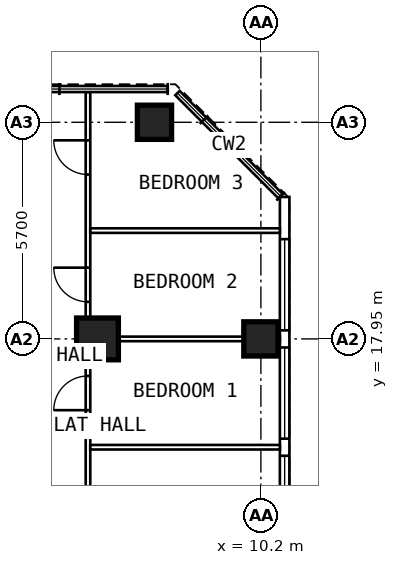
"""IFC4 building model, lengths in metres.
Left out: names, types, materials, properties, quantities, classifications, styles, units other than length and angle.
Written with IfcOpenShell. Run it as: python <this file> out.ifc"""

import sys

from ifc_helpers import new_model, si_unit, direction, frame, frame_2d, origin, origin_2d, place, context, subcontext, project, spatial, rectangle, extrude, element, fill, save


model = new_model("IFC4")
c1 = context("Model", 3, precision=1e-05, world=origin(), true_north=direction((0.0, 1.0)))
c2 = subcontext(c1, "Body", "Model", "MODEL_VIEW")
j1 = project(units=[si_unit("LENGTHUNIT", "METRE"), si_unit("PLANEANGLEUNIT", "RADIAN")], contexts=[c1])
p1 = place(None, origin())
s1 = spatial("IfcSite", under=j1, at=p1, CompositionType="ELEMENT")
p2 = place(p1, origin())
s2 = spatial("IfcBuilding", under=s1, at=p2, CompositionType="ELEMENT")
p3 = place(p2, frame((0.0, 0.0, 215.4)))
s3 = spatial("IfcBuildingStorey", under=s2, at=p3, CompositionType="ELEMENT", Elevation=215.4)
for number, where, z_axis, x_axis in (
    (1, (10.2, 17.95, 0.0), (0.0, 0.0, 1.0), (0.0, 1.0, 0.0)),
    (2, (7.4, 23.65, 0.0), (0.0, 0.0, 1.0), (0.0, 1.0, 0.0)),
):
    element("IfcColumn", number, at=place(p3, frame(where, z_axis=z_axis, x_axis=x_axis)), inside=s3, PredefinedType="COLUMN", context=c2, shape_type="SweptSolid", body=[
        extrude(rectangle(XDim=0.9, YDim=0.9, at=origin_2d()), origin(), (0.0, 0.0, 1.0), 3.6),
    ])
p4 = place(p3, frame((5.9, 17.95, 0.0), z_axis=(0.0, 0.0, 1.0), x_axis=(0.0, 1.0, 0.0)))
e3 = element("IfcColumn", 3, at=p4, inside=s3, PredefinedType="COLUMN", context=c2, shape_type="SweptSolid", body=[
    extrude(rectangle(XDim=1.1, YDim=1.1, at=origin_2d()), origin(), (0.0, 0.0, 1.0), 3.6),
])
p5 = place(p3, frame((10.825, 6.409, 0.0), z_axis=(0.0, 0.0, 1.0), x_axis=(0.0, 1.0, 0.0)))
e4 = element("IfcWall", 4, at=p5, inside=s3, PredefinedType="SOLIDWALL", context=c2, shape_type="SweptSolid", body=[
    extrude(rectangle(XDim=15.276, YDim=0.25, at=frame_2d((7.638, 0.0))), origin(), (0.0, 0.0, 1.0), 3.35),
])
p6 = place(p5, frame((0.366, 0.0, 0.8)))
e5 = element("IfcOpeningElement", 5, at=p6, cuts=e4, PredefinedType="OPENING", context=c2, shape_type="SweptSolid", body=[
    extrude(rectangle(XDim=2.4, YDim=1.8, at=frame_2d((1.2, 0.9))), frame((0.0, 0.137, 0.0), z_axis=(0.0, -1.0, 0.0), x_axis=(1.0, 0.0, 0.0)), (0.0, 0.0, 1.0), 0.274),
])
p7 = place(p5, frame((3.216, 0.0, 0.8)))
e6 = element("IfcOpeningElement", 6, at=p7, cuts=e4, PredefinedType="OPENING", context=c2, shape_type="SweptSolid", body=[
    extrude(rectangle(XDim=2.4, YDim=1.8, at=frame_2d((1.2, 0.9))), frame((0.0, 0.137, 0.0), z_axis=(0.0, -1.0, 0.0), x_axis=(1.0, 0.0, 0.0)), (0.0, 0.0, 1.0), 0.274),
])
p8 = place(p5, frame((6.066, 0.0, 0.8)))
e7 = element("IfcOpeningElement", 7, at=p8, cuts=e4, PredefinedType="OPENING", context=c2, shape_type="SweptSolid", body=[
    extrude(rectangle(XDim=2.4, YDim=1.8, at=frame_2d((1.2, 0.9))), frame((0.0, 0.137, 0.0), z_axis=(0.0, -1.0, 0.0), x_axis=(1.0, 0.0, 0.0)), (0.0, 0.0, 1.0), 0.274),
])
p9 = place(p5, frame((8.916, 0.0, 0.8)))
e8 = element("IfcOpeningElement", 8, at=p9, cuts=e4, PredefinedType="OPENING", context=c2, shape_type="SweptSolid", body=[
    extrude(rectangle(XDim=2.4, YDim=1.8, at=frame_2d((1.2, 0.9))), frame((0.0, 0.137, 0.0), z_axis=(0.0, -1.0, 0.0), x_axis=(1.0, 0.0, 0.0)), (0.0, 0.0, 1.0), 0.274),
])
p10 = place(p5, frame((11.766, 0.0, 0.8)))
e9 = element("IfcOpeningElement", 9, at=p10, cuts=e4, PredefinedType="OPENING", context=c2, shape_type="SweptSolid", body=[
    extrude(rectangle(XDim=2.4, YDim=1.8, at=frame_2d((1.2, 0.9))), frame((0.0, 0.137, 0.0), z_axis=(0.0, -1.0, 0.0), x_axis=(1.0, 0.0, 0.0)), (0.0, 0.0, 1.0), 0.274),
])
p11 = place(p3, frame((5.65, 9.6, 0.0), z_axis=(0.0, 0.0, 1.0), x_axis=(0.0, 1.0, 0.0)))
e10 = element("IfcWall", 10, at=p11, inside=s3, PredefinedType="PARTITIONING", context=c2, shape_type="SweptSolid", body=[
    extrude(rectangle(XDim=14.845, YDim=0.12, at=frame_2d((7.422, 0.0))), origin(), (0.0, 0.0, 1.0), 3.35),
])
p12 = place(p11, frame((3.35, 0.0, 0.0)))
e11 = element("IfcOpeningElement", 11, at=p12, cuts=e10, PredefinedType="OPENING", context=c2, shape_type="SweptSolid", body=[
    extrude(rectangle(XDim=0.9, YDim=2.1, at=frame_2d((0.45, 1.05))), frame((0.0, 0.072, 0.0), z_axis=(0.0, -1.0, 0.0), x_axis=(1.0, 0.0, 0.0)), (0.0, 0.0, 1.0), 0.144),
])
p13 = place(p11, frame((6.475, 0.0, 0.0)))
e12 = element("IfcOpeningElement", 12, at=p13, cuts=e10, PredefinedType="OPENING", context=c2, shape_type="SweptSolid", body=[
    extrude(rectangle(XDim=0.9, YDim=2.1, at=frame_2d((0.45, 1.05))), frame((0.0, 0.072, 0.0), z_axis=(0.0, -1.0, 0.0), x_axis=(1.0, 0.0, 0.0)), (0.0, 0.0, 1.0), 0.144),
])
p14 = place(p11, frame((9.325, 0.0, 0.0)))
e13 = element("IfcOpeningElement", 13, at=p14, cuts=e10, PredefinedType="OPENING", context=c2, shape_type="SweptSolid", body=[
    extrude(rectangle(XDim=0.9, YDim=2.1, at=frame_2d((0.45, 1.05))), frame((0.0, 0.072, 0.0), z_axis=(0.0, -1.0, 0.0), x_axis=(1.0, 0.0, 0.0)), (0.0, 0.0, 1.0), 0.144),
])
p15 = place(p11, frame((12.675, 0.0, 0.0)))
e14 = element("IfcOpeningElement", 14, at=p15, cuts=e10, PredefinedType="OPENING", context=c2, shape_type="SweptSolid", body=[
    extrude(rectangle(XDim=0.9, YDim=2.1, at=frame_2d((0.45, 1.05))), frame((0.0, 0.072, 0.0), z_axis=(0.0, -1.0, 0.0), x_axis=(1.0, 0.0, 0.0)), (0.0, 0.0, 1.0), 0.144),
])
p16 = place(p3, frame((5.71, 15.1, 0.0), z_axis=(0.0, 0.0, 1.0), x_axis=(1.0, 0.0, 0.0)))
e15 = element("IfcWall", 15, at=p16, inside=s3, PredefinedType="PARTITIONING", context=c2, shape_type="SweptSolid", body=[
    extrude(rectangle(XDim=4.99, YDim=0.12, at=frame_2d((2.495, 0.0))), origin(), (0.0, 0.0, 1.0), 3.35),
])
p17 = place(p3, frame((5.71, 17.95, 0.0), z_axis=(0.0, 0.0, 1.0), x_axis=(1.0, 0.0, 0.0)))
e16 = element("IfcWall", 16, at=p17, inside=s3, PredefinedType="PARTITIONING", context=c2, shape_type="SweptSolid", body=[
    extrude(rectangle(XDim=4.99, YDim=0.12, at=frame_2d((2.495, 0.0))), origin(), (0.0, 0.0, 1.0), 2.45),
])
p18 = place(p3, frame((5.71, 20.8, 0.0), z_axis=(0.0, 0.0, 1.0), x_axis=(1.0, 0.0, 0.0)))
e17 = element("IfcWall", 17, at=p18, inside=s3, PredefinedType="PARTITIONING", context=c2, shape_type="SweptSolid", body=[
    extrude(rectangle(XDim=4.99, YDim=0.12, at=frame_2d((2.495, 0.0))), origin(), (0.0, 0.0, 1.0), 3.35),
])
p19 = place(p8, origin())
e18 = element("IfcWindow", 18, at=p19, inside=s3, PartitioningType="SINGLE_PANEL", PredefinedType="WINDOW", context=c2, shape_type="SweptSolid", body=[
    extrude(rectangle(XDim=2.4, YDim=1.8, at=frame_2d((1.2, 0.9))), frame((0.0, 0.03, 0.0), z_axis=(0.0, -1.0, 0.0), x_axis=(1.0, 0.0, 0.0)), (0.0, 0.0, 1.0), 0.06),
])
fill(e7, e18)
p20 = place(p9, origin())
e19 = element("IfcWindow", 19, at=p20, inside=s3, PartitioningType="SINGLE_PANEL", PredefinedType="WINDOW", context=c2, shape_type="SweptSolid", body=[
    extrude(rectangle(XDim=2.4, YDim=1.8, at=frame_2d((1.2, 0.9))), frame((0.0, 0.03, 0.0), z_axis=(0.0, -1.0, 0.0), x_axis=(1.0, 0.0, 0.0)), (0.0, 0.0, 1.0), 0.06),
])
fill(e8, e19)
p21 = place(p10, origin())
e20 = element("IfcWindow", 20, at=p21, inside=s3, PartitioningType="SINGLE_PANEL", PredefinedType="WINDOW", context=c2, shape_type="SweptSolid", body=[
    extrude(rectangle(XDim=2.4, YDim=1.8, at=frame_2d((1.2, 0.9))), frame((0.0, 0.03, 0.0), z_axis=(0.0, -1.0, 0.0), x_axis=(1.0, 0.0, 0.0)), (0.0, 0.0, 1.0), 0.06),
])
fill(e9, e20)
p22 = place(p13, origin())
e21 = element("IfcDoor", 21, at=p22, inside=s3, OperationType="SINGLE_SWING_LEFT", PredefinedType="DOOR", context=c2, shape_type="SweptSolid", body=[
    extrude(rectangle(XDim=0.9, YDim=2.1, at=frame_2d((0.45, 1.05))), frame((0.0, 0.025, 0.0), z_axis=(0.0, -1.0, 0.0), x_axis=(1.0, 0.0, 0.0)), (0.0, 0.0, 1.0), 0.05),
])
fill(e12, e21)
p23 = place(p14, origin())
e22 = element("IfcDoor", 22, at=p23, inside=s3, OperationType="SINGLE_SWING_RIGHT", PredefinedType="DOOR", context=c2, shape_type="SweptSolid", body=[
    extrude(rectangle(XDim=0.9, YDim=2.1, at=frame_2d((0.45, 1.05))), frame((0.0, 0.025, 0.0), z_axis=(0.0, -1.0, 0.0), x_axis=(1.0, 0.0, 0.0)), (0.0, 0.0, 1.0), 0.05),
])
fill(e13, e22)
p24 = place(p15, origin())
e23 = element("IfcDoor", 23, at=p24, inside=s3, OperationType="SINGLE_SWING_RIGHT", PredefinedType="DOOR", context=c2, shape_type="SweptSolid", body=[
    extrude(rectangle(XDim=0.9, YDim=2.1, at=frame_2d((0.45, 1.05))), frame((0.0, 0.025, 0.0), z_axis=(0.0, -1.0, 0.0), x_axis=(1.0, 0.0, 0.0)), (0.0, 0.0, 1.0), 0.05),
])
fill(e14, e23)
save(model, sys.argv[1])
